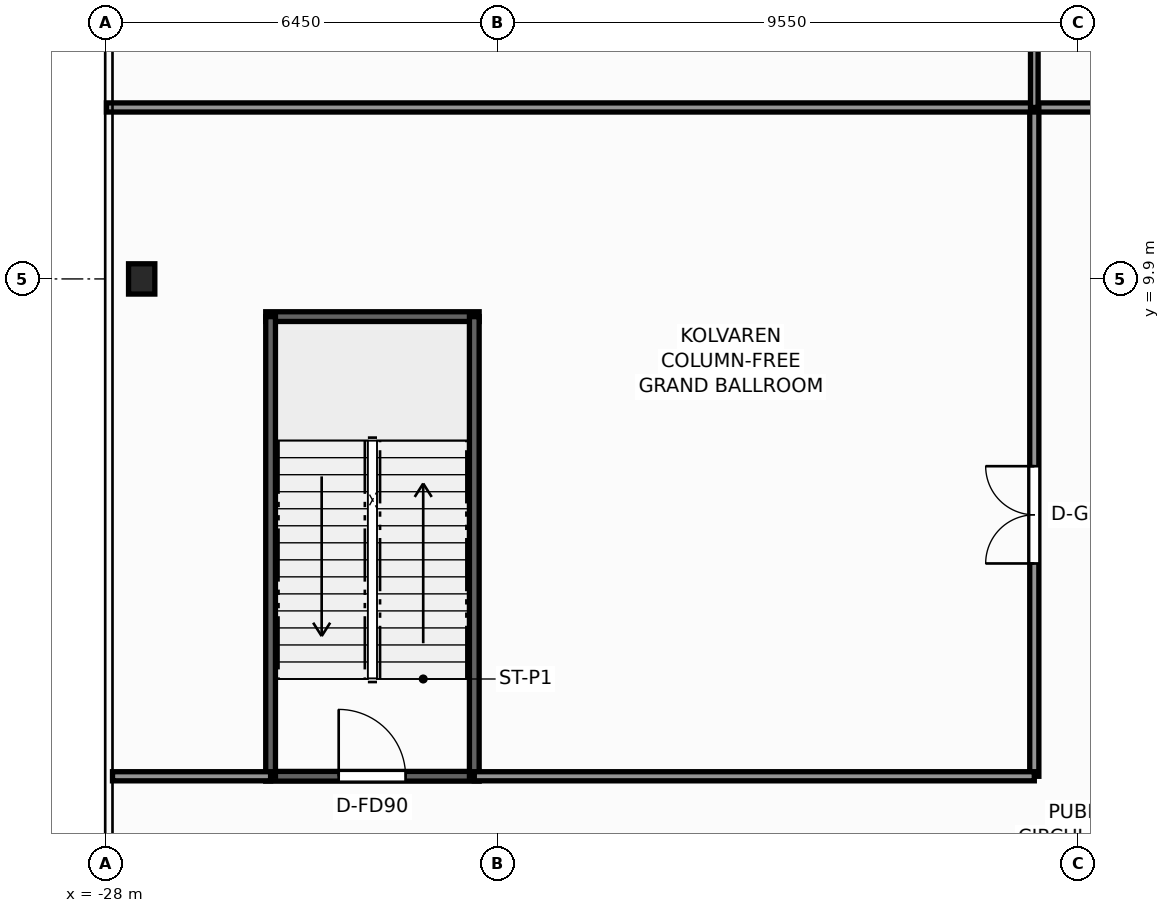
"""IFC4 building model, lengths in metres.
Left out: names, types, materials, properties, quantities, classifications, styles, units other than length and angle.
Written with IfcOpenShell. Run it as: python <this file> out.ifc"""

import sys

from ifc_helpers import new_model, si_unit, direction, frame, frame_2d, origin, origin_2d, place, context, subcontext, project, spatial, rectangle, i_section, extrude, element, fill, save


model = new_model("IFC4")
c1 = context("Model", 3, precision=1e-05, world=origin(), true_north=direction((0.0, 1.0)))
c2 = subcontext(c1, "Body", "Model", "MODEL_VIEW")
j1 = project(units=[si_unit("LENGTHUNIT", "METRE"), si_unit("PLANEANGLEUNIT", "RADIAN")], contexts=[c1])
p1 = place(None, origin())
s1 = spatial("IfcSite", under=j1, at=p1, CompositionType="ELEMENT")
p2 = place(p1, origin())
s2 = spatial("IfcBuilding", under=s1, at=p2, CompositionType="ELEMENT")
p3 = place(p2, frame((0.0, 0.0, 10.0)))
s3 = spatial("IfcBuildingStorey", under=s2, at=p3, CompositionType="ELEMENT", Elevation=10.0)
p4 = place(p3, frame((-27.4, 9.9, 0.0), z_axis=(0.0, 0.0, 1.0), x_axis=(1.0, 0.0, 0.0)))
e1 = element("IfcColumn", 1, at=p4, inside=s3, PredefinedType="COLUMN", context=c2, shape_type="SweptSolid", body=[
    extrude(i_section(OverallWidth=0.432, OverallDepth=0.498, WebThickness=0.056, FlangeThickness=0.089, FilletRadius=0.025, at=origin_2d()), origin(), (0.0, 0.0, 1.0), 5.2),
])
p5 = place(p3, frame((-25.36, 1.72, 0.0), z_axis=(0.0, 0.0, 1.0), x_axis=(1.0, 0.0, 0.0)))
e2 = element("IfcWall", 2, at=p5, inside=s3, PredefinedType="SHEAR", context=c2, shape_type="SweptSolid", body=[
    extrude(rectangle(XDim=3.51, YDim=0.16, at=frame_2d((1.755, 0.0))), origin(), (0.0, 0.0, 1.0), 5.2),
])
p6 = place(p5, frame((1.2, 0.0, 0.0)))
e3 = element("IfcOpeningElement", 3, at=p6, cuts=e2, PredefinedType="OPENING", context=c2, shape_type="SweptSolid", body=[
    extrude(rectangle(XDim=1.1, YDim=2.2, at=frame_2d((0.55, 1.1))), frame((0.0, 0.09, 0.0), z_axis=(0.0, -1.0, 0.0), x_axis=(1.0, 0.0, 0.0)), (0.0, 0.0, 1.0), 0.18),
])
p7 = place(p3, frame((-25.36, 9.28, 0.0), z_axis=(0.0, 0.0, 1.0), x_axis=(1.0, 0.0, 0.0)))
e4 = element("IfcWall", 4, at=p7, inside=s3, PredefinedType="SHEAR", context=c2, shape_type="SweptSolid", body=[
    extrude(rectangle(XDim=3.51, YDim=0.16, at=frame_2d((1.755, 0.0))), origin(), (0.0, 0.0, 1.0), 5.2),
])
for number, where, z_axis, x_axis in (
    (5, (-25.28, 1.72, 0.0), (0.0, 0.0, 1.0), (0.0, 1.0, 0.0)),
    (6, (-21.93, 1.72, 0.0), (0.0, 0.0, 1.0), (0.0, 1.0, 0.0)),
):
    element("IfcWall", number, at=place(p3, frame(where, z_axis=z_axis, x_axis=x_axis)), inside=s3, PredefinedType="SHEAR", context=c2, shape_type="SweptSolid", body=[
        extrude(rectangle(XDim=7.56, YDim=0.16, at=frame_2d((3.78, 0.0))), origin(), (0.0, 0.0, 1.0), 5.2),
    ])
p8 = place(p3, frame((-12.72, 12.72, 0.0), z_axis=(0.0, 0.0, 1.0), x_axis=(1.0, 0.0, 0.0)))
e7 = element("IfcWall", 7, at=p8, inside=s3, PredefinedType="PARTITIONING", context=c2, shape_type="SweptSolid", body=[
    extrude(rectangle(XDim=25.44, YDim=0.15, at=frame_2d((12.72, 0.0))), origin(), (0.0, 0.0, 1.0), 3.894),
])
p9 = place(p8, frame((1.8, 0.0, 0.0)))
e8 = element("IfcOpeningElement", 8, at=p9, cuts=e7, PredefinedType="OPENING", context=c2, shape_type="SweptSolid", body=[
    extrude(rectangle(XDim=0.95, YDim=2.06, at=frame_2d((0.475, 1.03))), frame((0.0, 0.085, 0.0), z_axis=(0.0, -1.0, 0.0), x_axis=(1.0, 0.0, 0.0)), (0.0, 0.0, 1.0), 0.17),
])
p10 = place(p8, frame((9.2, 0.0, 0.0)))
e9 = element("IfcOpeningElement", 9, at=p10, cuts=e7, PredefinedType="OPENING", context=c2, shape_type="SweptSolid", body=[
    extrude(rectangle(XDim=1.2, YDim=2.2, at=frame_2d((0.6, 1.1))), frame((0.0, 0.085, 0.0), z_axis=(0.0, -1.0, 0.0), x_axis=(1.0, 0.0, 0.0)), (0.0, 0.0, 1.0), 0.17),
])
p11 = place(p8, frame((19.2, 0.0, 0.0)))
e10 = element("IfcOpeningElement", 10, at=p11, cuts=e7, PredefinedType="OPENING", context=c2, shape_type="SweptSolid", body=[
    extrude(rectangle(XDim=1.1, YDim=2.2, at=frame_2d((0.55, 1.1))), frame((0.0, 0.085, 0.0), z_axis=(0.0, -1.0, 0.0), x_axis=(1.0, 0.0, 0.0)), (0.0, 0.0, 1.0), 0.17),
])
p12 = place(p3, frame((-12.72, 1.72, 0.0), z_axis=(0.0, 0.0, 1.0), x_axis=(0.0, 1.0, 0.0)))
e11 = element("IfcWall", 11, at=p12, inside=s3, PredefinedType="PARTITIONING", context=c2, shape_type="SweptSolid", body=[
    extrude(rectangle(XDim=11.0, YDim=0.15, at=frame_2d((5.5, 0.0))), origin(), (0.0, 0.0, 1.0), 3.894),
])
p13 = place(p12, frame((3.5, 0.0, 0.0)))
e12 = element("IfcOpeningElement", 12, at=p13, cuts=e11, PredefinedType="OPENING", context=c2, shape_type="SweptSolid", body=[
    extrude(rectangle(XDim=1.6, YDim=2.3, at=frame_2d((0.8, 1.15))), frame((0.0, 0.085, 0.0), z_axis=(0.0, -1.0, 0.0), x_axis=(1.0, 0.0, 0.0)), (0.0, 0.0, 1.0), 0.17),
])
p14 = place(p3, frame((-27.88, 1.72, 0.0), z_axis=(0.0, 0.0, 1.0), x_axis=(1.0, 0.0, 0.0)))
e13 = element("IfcWall", 13, at=p14, inside=s3, PredefinedType="PARTITIONING", context=c2, shape_type="SweptSolid", body=[
    extrude(rectangle(XDim=2.6, YDim=0.15, at=frame_2d((1.3, 0.0))), origin(), (0.0, 0.0, 1.0), 4.289),
])
p15 = place(p3, frame((-21.93, 1.72, 0.0), z_axis=(0.0, 0.0, 1.0), x_axis=(1.0, 0.0, 0.0)))
e14 = element("IfcWall", 14, at=p15, inside=s3, PredefinedType="PARTITIONING", context=c2, shape_type="SweptSolid", body=[
    extrude(rectangle(XDim=9.21, YDim=0.15, at=frame_2d((4.605, 0.0))), origin(), (0.0, 0.0, 1.0), 4.92),
])
p16 = place(p3, frame((-27.98, 12.72, 0.0), z_axis=(0.0, 0.0, 1.0), x_axis=(1.0, 0.0, 0.0)))
e15 = element("IfcWall", 15, at=p16, inside=s3, PredefinedType="PARTITIONING", context=c2, shape_type="SweptSolid", body=[
    extrude(rectangle(XDim=15.26, YDim=0.15, at=frame_2d((7.63, 0.0))), origin(), (0.0, 0.0, 1.0), 4.289),
])
p17 = place(p3, frame((-12.72, 12.72, 0.0), z_axis=(0.0, 0.0, 1.0), x_axis=(0.0, 1.0, 0.0)))
e16 = element("IfcWall", 16, at=p17, inside=s3, PredefinedType="PARTITIONING", context=c2, shape_type="SweptSolid", body=[
    extrude(rectangle(XDim=5.48, YDim=0.125, at=frame_2d((2.74, 0.0))), origin(), (0.0, 0.0, 1.0), 4.92),
])
p18 = place(p6, origin())
e17 = element("IfcDoor", 17, at=p18, inside=s3, OperationType="SINGLE_SWING_LEFT", PredefinedType="DOOR", context=c2, shape_type="SweptSolid", body=[
    extrude(rectangle(XDim=1.1, YDim=2.2, at=frame_2d((0.55, 1.1))), frame((0.0, 0.025, 0.0), z_axis=(0.0, -1.0, 0.0), x_axis=(1.0, 0.0, 0.0)), (0.0, 0.0, 1.0), 0.05),
])
fill(e3, e17)
p19 = place(p13, origin())
e18 = element("IfcDoor", 18, at=p19, inside=s3, OperationType="DOUBLE_DOOR_SINGLE_SWING", PredefinedType="DOOR", context=c2, shape_type="SweptSolid", body=[
    extrude(rectangle(XDim=1.6, YDim=2.3, at=frame_2d((0.8, 1.15))), frame((0.0, 0.025, 0.0), z_axis=(0.0, -1.0, 0.0), x_axis=(1.0, 0.0, 0.0)), (0.0, 0.0, 1.0), 0.05),
])
fill(e12, e18)
save(model, sys.argv[1])
